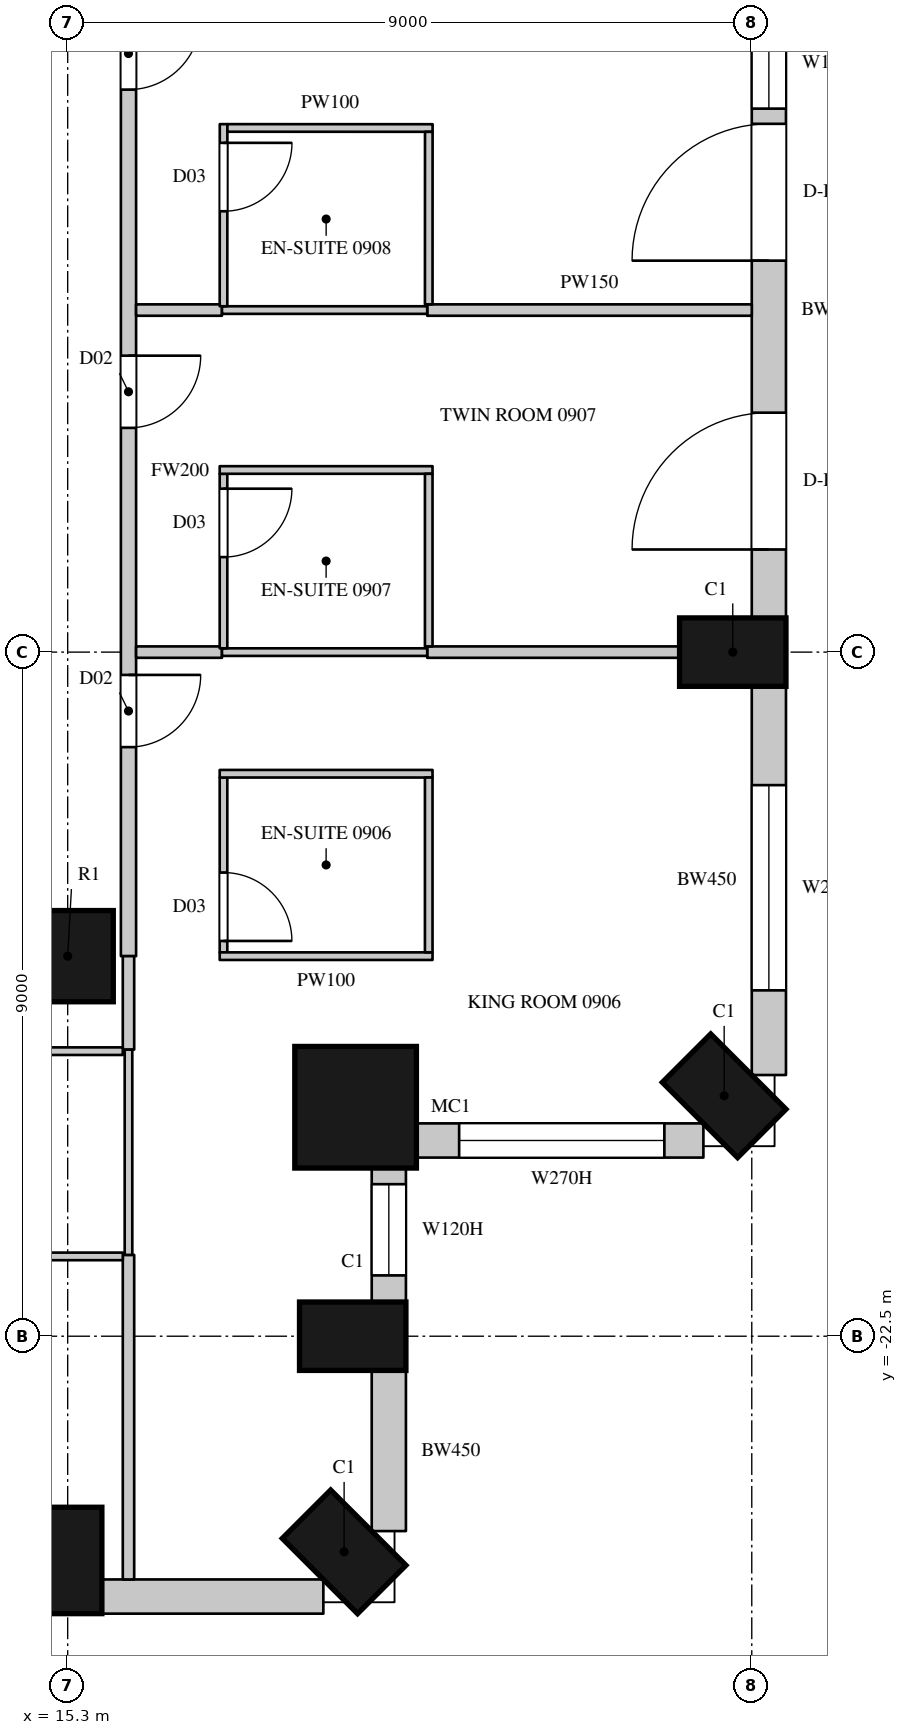
"""IFC4 building model, lengths in metres.
Left out: names, types, materials, properties, quantities, classifications, styles, units other than length and angle.
Written with IfcOpenShell. Run it as: python <this file> out.ifc"""

import sys

from ifc_helpers import new_model, si_unit, direction, frame, frame_2d, origin, origin_2d, place, context, subcontext, project, spatial, rectangle, circle, extrude, element, fill, save


model = new_model("IFC4")
c1 = context("Model", 3, precision=1e-05, world=origin(), true_north=direction((0.0, 1.0)))
c2 = subcontext(c1, "Body", "Model", "MODEL_VIEW")
j1 = project(units=[si_unit("LENGTHUNIT", "METRE"), si_unit("PLANEANGLEUNIT", "RADIAN")], contexts=[c1])
p1 = place(None, origin())
s1 = spatial("IfcSite", under=j1, at=p1, CompositionType="ELEMENT")
p2 = place(p1, origin())
s2 = spatial("IfcBuilding", under=s1, at=p2, CompositionType="ELEMENT")
p3 = place(p2, frame((0.0, 0.0, 62.7)))
s3 = spatial("IfcBuildingStorey", under=s2, at=p3, CompositionType="ELEMENT", Elevation=62.7)
for number, where, z_axis, x_axis in (
    (1, (15.3, -25.45, 0.0), (0.0, 0.0, 1.0), (1.0, 0.0, 0.0)),
    (2, (18.937, -25.337, 0.0), (0.0, 0.0, 1.0), (0.707, 0.707, 0.0)),
    (3, (19.05, -22.5, 0.0), (0.0, 0.0, 1.0), (0.0, 1.0, 0.0)),
):
    element("IfcColumn", number, at=place(p3, frame(where, z_axis=z_axis, x_axis=x_axis)), inside=s3, PredefinedType="COLUMN", context=c2, shape_type="SweptSolid", body=[
        extrude(rectangle(XDim=0.9, YDim=1.4, at=origin_2d()), origin(), (0.0, 0.0, 1.0), 3.6),
    ])
p4 = place(p3, frame((19.088, -19.488, 0.0), z_axis=(0.0, 0.0, 1.0), x_axis=(1.0, 0.0, 0.0)))
e4 = element("IfcColumn", 4, at=p4, inside=s3, PredefinedType="COLUMN", context=c2, shape_type="SweptSolid", body=[
    extrude(circle(Radius=0.8, at=origin_2d()), origin(), (0.0, 0.0, 1.0), 3.6),
])
for number, where, z_axis, x_axis in (
    (5, (23.937, -19.337, 0.0), (0.0, 0.0, 1.0), (0.707, 0.707, 0.0)),
    (6, (24.05, -13.5, 0.0), (0.0, 0.0, 1.0), (0.0, 1.0, 0.0)),
):
    element("IfcColumn", number, at=place(p3, frame(where, z_axis=z_axis, x_axis=x_axis)), inside=s3, PredefinedType="COLUMN", context=c2, shape_type="SweptSolid", body=[
        extrude(rectangle(XDim=0.9, YDim=1.4, at=origin_2d()), origin(), (0.0, 0.0, 1.0), 3.6),
    ])
p5 = place(p3, frame((15.3, -17.5, 0.0), z_axis=(0.0, 0.0, 1.0), x_axis=(1.0, 0.0, 0.0)))
e7 = element("IfcColumn", 7, at=p5, inside=s3, PredefinedType="COLUMN", context=c2, shape_type="SweptSolid", body=[
    extrude(circle(Radius=0.6, at=origin_2d()), origin(), (0.0, 0.0, 1.0), 3.6),
])
p6 = place(p3, frame((15.75, -25.925, 0.0), z_axis=(0.0, 0.0, 1.0), x_axis=(1.0, 0.0, 0.0)))
e8 = element("IfcWall", 8, at=p6, inside=s3, PredefinedType="SOLIDWALL", context=c2, shape_type="SweptSolid", body=[
    extrude(rectangle(XDim=2.914, YDim=0.45, at=frame_2d((1.457, 0.0))), origin(), (0.0, 0.0, 1.0), 3.3),
])
p7 = place(p3, frame((19.525, -25.064, 0.0), z_axis=(0.0, 0.0, 1.0), x_axis=(0.0, 1.0, 0.0)))
e9 = element("IfcWall", 9, at=p7, inside=s3, PredefinedType="SOLIDWALL", context=c2, shape_type="SweptSolid", body=[
    extrude(rectangle(XDim=2.114, YDim=0.45, at=frame_2d((1.057, 0.0))), origin(), (0.0, 0.0, 1.0), 3.3),
])
p8 = place(p3, frame((19.525, -22.05, 0.0), z_axis=(0.0, 0.0, 1.0), x_axis=(0.0, 1.0, 0.0)))
e10 = element("IfcWall", 10, at=p8, inside=s3, PredefinedType="SOLIDWALL", context=c2, shape_type="SweptSolid", body=[
    extrude(rectangle(XDim=1.792, YDim=0.45, at=frame_2d((0.896, 0.0))), origin(), (0.0, 0.0, 1.0), 3.3),
])
p9 = place(p8, frame((0.35, 0.0, 1.05)))
e11 = element("IfcOpeningElement", 11, at=p9, cuts=e10, PredefinedType="OPENING", context=c2, shape_type="SweptSolid", body=[
    extrude(rectangle(XDim=1.2, YDim=2.0, at=frame_2d((0.6, 1.0))), frame((0.0, 0.235, 0.0), z_axis=(0.0, -1.0, 0.0), x_axis=(1.0, 0.0, 0.0)), (0.0, 0.0, 1.0), 0.47),
])
p10 = place(p3, frame((19.858, -19.925, 0.0), z_axis=(0.0, 0.0, 1.0), x_axis=(1.0, 0.0, 0.0)))
e12 = element("IfcWall", 12, at=p10, inside=s3, PredefinedType="SOLIDWALL", context=c2, shape_type="SweptSolid", body=[
    extrude(rectangle(XDim=3.805, YDim=0.45, at=frame_2d((1.903, 0.0))), origin(), (0.0, 0.0, 1.0), 3.3),
])
p11 = place(p10, frame((0.592, 0.0, 1.05)))
e13 = element("IfcOpeningElement", 13, at=p11, cuts=e12, PredefinedType="OPENING", context=c2, shape_type="SweptSolid", body=[
    extrude(rectangle(XDim=2.7, YDim=2.0, at=frame_2d((1.35, 1.0))), frame((0.0, 0.235, 0.0), z_axis=(0.0, -1.0, 0.0), x_axis=(1.0, 0.0, 0.0)), (0.0, 0.0, 1.0), 0.47),
])
p12 = place(p3, frame((24.525, -19.064, 0.0), z_axis=(0.0, 0.0, 1.0), x_axis=(0.0, 1.0, 0.0)))
e14 = element("IfcWall", 14, at=p12, inside=s3, PredefinedType="SOLIDWALL", context=c2, shape_type="SweptSolid", body=[
    extrude(rectangle(XDim=5.114, YDim=0.45, at=frame_2d((2.557, 0.0))), origin(), (0.0, 0.0, 1.0), 3.3),
])
p13 = place(p12, frame((1.114, 0.0, 1.05)))
e15 = element("IfcOpeningElement", 15, at=p13, cuts=e14, PredefinedType="OPENING", context=c2, shape_type="SweptSolid", body=[
    extrude(rectangle(XDim=2.7, YDim=2.0, at=frame_2d((1.35, 1.0))), frame((0.0, 0.235, 0.0), z_axis=(0.0, -1.0, 0.0), x_axis=(1.0, 0.0, 0.0)), (0.0, 0.0, 1.0), 0.47),
])
p14 = place(p3, frame((24.525, -13.05, 0.0), z_axis=(0.0, 0.0, 1.0), x_axis=(0.0, 1.0, 0.0)))
e16 = element("IfcWall", 16, at=p14, inside=s3, PredefinedType="SOLIDWALL", context=c2, shape_type="SweptSolid", body=[
    extrude(rectangle(XDim=8.1, YDim=0.45, at=frame_2d((4.05, 0.0))), origin(), (0.0, 0.0, 1.0), 3.3),
])
p15 = place(p14, frame((0.9, 0.0, 0.0)))
e17 = element("IfcOpeningElement", 17, at=p15, cuts=e16, PredefinedType="OPENING", context=c2, shape_type="SweptSolid", body=[
    extrude(rectangle(XDim=1.8, YDim=2.4, at=frame_2d((0.9, 1.2))), frame((0.0, 0.235, 0.0), z_axis=(0.0, -1.0, 0.0), x_axis=(1.0, 0.0, 0.0)), (0.0, 0.0, 1.0), 0.47),
])
p16 = place(p14, frame((4.7, 0.0, 0.0)))
e18 = element("IfcOpeningElement", 18, at=p16, cuts=e16, PredefinedType="OPENING", context=c2, shape_type="SweptSolid", body=[
    extrude(rectangle(XDim=1.8, YDim=2.4, at=frame_2d((0.9, 1.2))), frame((0.0, 0.235, 0.0), z_axis=(0.0, -1.0, 0.0), x_axis=(1.0, 0.0, 0.0)), (0.0, 0.0, 1.0), 0.47),
])
p17 = place(p14, frame((6.7, 0.0, 1.05)))
e19 = element("IfcOpeningElement", 19, at=p17, cuts=e16, PredefinedType="OPENING", context=c2, shape_type="SweptSolid", body=[
    extrude(rectangle(XDim=1.2, YDim=2.0, at=frame_2d((0.6, 1.0))), frame((0.0, 0.235, 0.0), z_axis=(0.0, -1.0, 0.0), x_axis=(1.0, 0.0, 0.0)), (0.0, 0.0, 1.0), 0.47),
])
p18 = place(p3, frame((16.1, -17.5, 0.0), z_axis=(0.0, 0.0, 1.0), x_axis=(0.0, 1.0, 0.0)))
e20 = element("IfcWall", 20, at=p18, inside=s3, PredefinedType="PARTITIONING", context=c2, shape_type="SweptSolid", body=[
    extrude(rectangle(XDim=12.75, YDim=0.2, at=frame_2d((6.375, 0.0))), origin(), (0.0, 0.0, 1.0), 3.3),
])
p19 = place(p18, frame((2.75, 0.0, 0.0)))
e21 = element("IfcOpeningElement", 21, at=p19, cuts=e20, PredefinedType="OPENING", context=c2, shape_type="SweptSolid", body=[
    extrude(rectangle(XDim=0.95, YDim=2.2, at=frame_2d((0.475, 1.1))), frame((0.0, 0.11, 0.0), z_axis=(0.0, -1.0, 0.0), x_axis=(1.0, 0.0, 0.0)), (0.0, 0.0, 1.0), 0.22),
])
p20 = place(p18, frame((6.95, 0.0, 0.0)))
e22 = element("IfcOpeningElement", 22, at=p20, cuts=e20, PredefinedType="OPENING", context=c2, shape_type="SweptSolid", body=[
    extrude(rectangle(XDim=0.95, YDim=2.2, at=frame_2d((0.475, 1.1))), frame((0.0, 0.11, 0.0), z_axis=(0.0, -1.0, 0.0), x_axis=(1.0, 0.0, 0.0)), (0.0, 0.0, 1.0), 0.22),
])
p21 = place(p18, frame((11.4, 0.0, 0.0)))
e23 = element("IfcOpeningElement", 23, at=p21, cuts=e20, PredefinedType="OPENING", context=c2, shape_type="SweptSolid", body=[
    extrude(rectangle(XDim=0.95, YDim=2.2, at=frame_2d((0.475, 1.1))), frame((0.0, 0.11, 0.0), z_axis=(0.0, -1.0, 0.0), x_axis=(1.0, 0.0, 0.0)), (0.0, 0.0, 1.0), 0.22),
])
p22 = place(p3, frame((16.1, -25.7, 0.0), z_axis=(0.0, 0.0, 1.0), x_axis=(0.0, 1.0, 0.0)))
e24 = element("IfcWall", 24, at=p22, inside=s3, PredefinedType="PARTITIONING", context=c2, shape_type="SweptSolid", body=[
    extrude(rectangle(XDim=4.27, YDim=0.15, at=frame_2d((2.135, 0.0))), origin(), (0.0, 0.0, 1.0), 3.3),
])
p23 = place(p3, frame((16.1, -18.73, 0.0), z_axis=(0.0, 0.0, 1.0), x_axis=(0.0, 1.0, 0.0)))
e25 = element("IfcWall", 25, at=p23, inside=s3, PredefinedType="PARTITIONING", context=c2, shape_type="SweptSolid", body=[
    extrude(rectangle(XDim=1.23, YDim=0.15, at=frame_2d((0.615, 0.0))), origin(), (0.0, 0.0, 1.0), 3.3),
])
p24 = place(p3, frame((16.2, -13.5, 0.0), z_axis=(0.0, 0.0, 1.0), x_axis=(1.0, 0.0, 0.0)))
e26 = element("IfcWall", 26, at=p24, inside=s3, PredefinedType="PARTITIONING", context=c2, shape_type="SweptSolid", body=[
    extrude(rectangle(XDim=1.13, YDim=0.15, at=frame_2d((0.565, 0.0))), origin(), (0.0, 0.0, 1.0), 3.3),
])
p25 = place(p3, frame((16.2, -9.0, 0.0), z_axis=(0.0, 0.0, 1.0), x_axis=(1.0, 0.0, 0.0)))
e27 = element("IfcWall", 27, at=p25, inside=s3, PredefinedType="PARTITIONING", context=c2, shape_type="SweptSolid", body=[
    extrude(rectangle(XDim=1.13, YDim=0.15, at=frame_2d((0.565, 0.0))), origin(), (0.0, 0.0, 1.0), 2.65),
])
p26 = place(p3, frame((20.03, -13.5, 0.0), z_axis=(0.0, 0.0, 1.0), x_axis=(1.0, 0.0, 0.0)))
e28 = element("IfcWall", 28, at=p26, inside=s3, PredefinedType="PARTITIONING", context=c2, shape_type="SweptSolid", body=[
    extrude(rectangle(XDim=3.32, YDim=0.15, at=frame_2d((1.66, 0.0))), origin(), (0.0, 0.0, 1.0), 3.3),
])
p27 = place(p3, frame((20.03, -9.0, 0.0), z_axis=(0.0, 0.0, 1.0), x_axis=(1.0, 0.0, 0.0)))
e29 = element("IfcWall", 29, at=p27, inside=s3, PredefinedType="PARTITIONING", context=c2, shape_type="SweptSolid", body=[
    extrude(rectangle(XDim=4.27, YDim=0.15, at=frame_2d((2.135, 0.0))), origin(), (0.0, 0.0, 1.0), 2.65),
])
for number, where, z_axis, x_axis in (
    (30, (13.65, -21.45, 0.0), (0.0, 0.0, 1.0), (1.0, 0.0, 0.0)),
    (31, (13.65, -18.75, 0.0), (0.0, 0.0, 1.0), (1.0, 0.0, 0.0)),
):
    element("IfcWall", number, at=place(p3, frame(where, z_axis=z_axis, x_axis=x_axis)), inside=s3, PredefinedType="PARTITIONING", context=c2, shape_type="SweptSolid", body=[
        extrude(rectangle(XDim=2.375, YDim=0.1, at=frame_2d((1.188, 0.0))), origin(), (0.0, 0.0, 1.0), 3.3),
    ])
for number, where, z_axis, x_axis in (
    (32, (16.1, -21.43, 0.0), (0.0, 0.0, 1.0), (0.0, 1.0, 0.0)),
    (33, (17.33, -13.5, 0.0), (0.0, 0.0, 1.0), (1.0, 0.0, 0.0)),
):
    element("IfcWall", number, at=place(p3, frame(where, z_axis=z_axis, x_axis=x_axis)), inside=s3, PredefinedType="PARTITIONING", context=c2, shape_type="SweptSolid", body=[
        extrude(rectangle(XDim=2.7, YDim=0.1, at=frame_2d((1.35, 0.0))), origin(), (0.0, 0.0, 1.0), 3.3),
    ])
p28 = place(p3, frame((17.33, -9.0, 0.0), z_axis=(0.0, 0.0, 1.0), x_axis=(1.0, 0.0, 0.0)))
e34 = element("IfcWall", 34, at=p28, inside=s3, PredefinedType="PARTITIONING", context=c2, shape_type="SweptSolid", body=[
    extrude(rectangle(XDim=2.7, YDim=0.1, at=frame_2d((1.35, 0.0))), origin(), (0.0, 0.0, 1.0), 2.65),
])
p29 = place(p3, frame((17.35, -17.45, 0.0), z_axis=(0.0, 0.0, 1.0), x_axis=(0.0, 1.0, 0.0)))
e35 = element("IfcWall", 35, at=p29, inside=s3, PredefinedType="PARTITIONING", context=c2, shape_type="SweptSolid", body=[
    extrude(rectangle(XDim=2.3, YDim=0.1, at=frame_2d((1.15, 0.0))), origin(), (0.0, 0.0, 1.0), 3.3),
])
p30 = place(p29, frame((0.15, 0.0, 0.0)))
e36 = element("IfcOpeningElement", 36, at=p30, cuts=e35, PredefinedType="OPENING", context=c2, shape_type="SweptSolid", body=[
    extrude(rectangle(XDim=0.9, YDim=2.2, at=frame_2d((0.45, 1.1))), frame((0.0, 0.06, 0.0), z_axis=(0.0, -1.0, 0.0), x_axis=(1.0, 0.0, 0.0)), (0.0, 0.0, 1.0), 0.12),
])
for number, where, z_axis, x_axis in (
    (37, (17.3, -17.5, 0.0), (0.0, 0.0, 1.0), (1.0, 0.0, 0.0)),
    (38, (17.3, -15.1, 0.0), (0.0, 0.0, 1.0), (1.0, 0.0, 0.0)),
):
    element("IfcWall", number, at=place(p3, frame(where, z_axis=z_axis, x_axis=x_axis)), inside=s3, PredefinedType="PARTITIONING", context=c2, shape_type="SweptSolid", body=[
        extrude(rectangle(XDim=2.8, YDim=0.1, at=frame_2d((1.4, 0.0))), origin(), (0.0, 0.0, 1.0), 3.3),
    ])
p31 = place(p3, frame((17.35, -13.45, 0.0), z_axis=(0.0, 0.0, 1.0), x_axis=(0.0, 1.0, 0.0)))
e39 = element("IfcWall", 39, at=p31, inside=s3, PredefinedType="PARTITIONING", context=c2, shape_type="SweptSolid", body=[
    extrude(rectangle(XDim=2.296, YDim=0.1, at=frame_2d((1.148, 0.0))), origin(), (0.0, 0.0, 1.0), 3.3),
])
p32 = place(p31, frame((1.2, 0.0, 0.0)))
e40 = element("IfcOpeningElement", 40, at=p32, cuts=e39, PredefinedType="OPENING", context=c2, shape_type="SweptSolid", body=[
    extrude(rectangle(XDim=0.9, YDim=2.2, at=frame_2d((0.45, 1.1))), frame((0.0, 0.06, 0.0), z_axis=(0.0, -1.0, 0.0), x_axis=(1.0, 0.0, 0.0)), (0.0, 0.0, 1.0), 0.12),
])
p33 = place(p3, frame((17.3, -11.104, 0.0), z_axis=(0.0, 0.0, 1.0), x_axis=(1.0, 0.0, 0.0)))
e41 = element("IfcWall", 41, at=p33, inside=s3, PredefinedType="PARTITIONING", context=c2, shape_type="SweptSolid", body=[
    extrude(rectangle(XDim=2.8, YDim=0.1, at=frame_2d((1.4, 0.0))), origin(), (0.0, 0.0, 1.0), 3.3),
])
p34 = place(p3, frame((17.35, -8.95, 0.0), z_axis=(0.0, 0.0, 1.0), x_axis=(0.000407580973, 0.999999916939, 0.0)))
e42 = element("IfcWall", 42, at=p34, inside=s3, PredefinedType="PARTITIONING", context=c2, shape_type="SweptSolid", body=[
    extrude(rectangle(XDim=2.396, YDim=0.1, at=frame_2d((1.198, 0.0))), origin(), (0.0, 0.0, 1.0), 3.3),
])
p35 = place(p34, frame((1.25, 0.0, 0.0)))
e43 = element("IfcOpeningElement", 43, at=p35, cuts=e42, PredefinedType="OPENING", context=c2, shape_type="SweptSolid", body=[
    extrude(rectangle(XDim=0.9, YDim=2.2, at=frame_2d((0.45, 1.1))), frame((0.0, 0.06, 0.0), z_axis=(0.0, -1.0, 0.0), x_axis=(1.0, 0.0, 0.0)), (0.0, 0.0, 1.0), 0.12),
])
p36 = place(p3, frame((17.401, -6.604, 0.0), z_axis=(0.0, 0.0, 1.0), x_axis=(0.9999999346, -0.000361663629, 0.0)))
e44 = element("IfcWall", 44, at=p36, inside=s3, PredefinedType="PARTITIONING", context=c2, shape_type="SweptSolid", body=[
    extrude(rectangle(XDim=2.7, YDim=0.1, at=frame_2d((1.35, 0.0))), origin(), (0.0, 0.0, 1.0), 3.3),
])
p37 = place(p3, frame((20.05, -17.45, 0.0), z_axis=(0.0, 0.0, 1.0), x_axis=(0.0, 1.0, 0.0)))
e45 = element("IfcWall", 45, at=p37, inside=s3, PredefinedType="PARTITIONING", context=c2, shape_type="SweptSolid", body=[
    extrude(rectangle(XDim=2.3, YDim=0.1, at=frame_2d((1.15, 0.0))), origin(), (0.0, 0.0, 1.0), 3.3),
])
p38 = place(p3, frame((20.05, -13.425, 0.0), z_axis=(0.0, 0.0, 1.0), x_axis=(0.0, 1.0, 0.0)))
e46 = element("IfcWall", 46, at=p38, inside=s3, PredefinedType="PARTITIONING", context=c2, shape_type="SweptSolid", body=[
    extrude(rectangle(XDim=2.271, YDim=0.1, at=frame_2d((1.135, 0.0))), origin(), (0.0, 0.0, 1.0), 3.3),
])
p39 = place(p3, frame((20.05, -8.925, 0.0), z_axis=(0.0, 0.0, 1.0), x_axis=(0.000430200003, 0.999999907464, 0.0)))
e47 = element("IfcWall", 47, at=p39, inside=s3, PredefinedType="PARTITIONING", context=c2, shape_type="SweptSolid", body=[
    extrude(rectangle(XDim=2.27, YDim=0.1, at=frame_2d((1.135, 0.0))), origin(), (0.0, 0.0, 1.0), 3.3),
])
p40 = place(p9, origin())
e48 = element("IfcWindow", 48, at=p40, inside=s3, PartitioningType="SINGLE_PANEL", PredefinedType="WINDOW", context=c2, shape_type="SweptSolid", body=[
    extrude(rectangle(XDim=1.2, YDim=2.0, at=frame_2d((0.6, 1.0))), frame((0.0, 0.135, 0.0), z_axis=(0.0, -1.0, 0.0), x_axis=(1.0, 0.0, 0.0)), (0.0, 0.0, 1.0), 0.06),
])
fill(e11, e48)
p41 = place(p11, origin())
e49 = element("IfcWindow", 49, at=p41, inside=s3, PartitioningType="SINGLE_PANEL", PredefinedType="WINDOW", context=c2, shape_type="SweptSolid", body=[
    extrude(rectangle(XDim=2.7, YDim=2.0, at=frame_2d((1.35, 1.0))), frame((0.0, 0.135, 0.0), z_axis=(0.0, -1.0, 0.0), x_axis=(1.0, 0.0, 0.0)), (0.0, 0.0, 1.0), 0.06),
])
fill(e13, e49)
p42 = place(p13, origin())
e50 = element("IfcWindow", 50, at=p42, inside=s3, PartitioningType="SINGLE_PANEL", PredefinedType="WINDOW", context=c2, shape_type="SweptSolid", body=[
    extrude(rectangle(XDim=2.7, YDim=2.0, at=frame_2d((1.35, 1.0))), frame((0.0, 0.135, 0.0), z_axis=(0.0, -1.0, 0.0), x_axis=(1.0, 0.0, 0.0)), (0.0, 0.0, 1.0), 0.06),
])
fill(e15, e50)
p43 = place(p15, origin())
e51 = element("IfcDoor", 51, at=p43, inside=s3, OperationType="SLIDING_TO_LEFT", PredefinedType="DOOR", context=c2, shape_type="SweptSolid", body=[
    extrude(rectangle(XDim=1.8, YDim=2.4, at=frame_2d((0.9, 1.2))), frame((0.0, 0.13, 0.0), z_axis=(0.0, -1.0, 0.0), x_axis=(1.0, 0.0, 0.0)), (0.0, 0.0, 1.0), 0.05),
])
fill(e17, e51)
p44 = place(p16, origin())
e52 = element("IfcDoor", 52, at=p44, inside=s3, OperationType="SLIDING_TO_LEFT", PredefinedType="DOOR", context=c2, shape_type="SweptSolid", body=[
    extrude(rectangle(XDim=1.8, YDim=2.4, at=frame_2d((0.9, 1.2))), frame((0.0, 0.13, 0.0), z_axis=(0.0, -1.0, 0.0), x_axis=(1.0, 0.0, 0.0)), (0.0, 0.0, 1.0), 0.05),
])
fill(e18, e52)
p45 = place(p17, origin())
e53 = element("IfcWindow", 53, at=p45, inside=s3, PartitioningType="SINGLE_PANEL", PredefinedType="WINDOW", context=c2, shape_type="SweptSolid", body=[
    extrude(rectangle(XDim=1.2, YDim=2.0, at=frame_2d((0.6, 1.0))), frame((0.0, 0.135, 0.0), z_axis=(0.0, -1.0, 0.0), x_axis=(1.0, 0.0, 0.0)), (0.0, 0.0, 1.0), 0.06),
])
fill(e19, e53)
p46 = place(p19, origin())
e54 = element("IfcDoor", 54, at=p46, inside=s3, OperationType="SINGLE_SWING_LEFT", PredefinedType="DOOR", context=c2, shape_type="SweptSolid", body=[
    extrude(rectangle(XDim=0.95, YDim=2.2, at=frame_2d((0.475, 1.1))), frame((0.0, 0.025, 0.0), z_axis=(0.0, -1.0, 0.0), x_axis=(1.0, 0.0, 0.0)), (0.0, 0.0, 1.0), 0.05),
])
fill(e21, e54)
p47 = place(p30, origin())
e55 = element("IfcDoor", 55, at=p47, inside=s3, OperationType="SINGLE_SWING_RIGHT", PredefinedType="DOOR", context=c2, shape_type="SweptSolid", body=[
    extrude(rectangle(XDim=0.9, YDim=2.2, at=frame_2d((0.45, 1.1))), frame((0.0, 0.025, 0.0), z_axis=(0.0, -1.0, 0.0), x_axis=(1.0, 0.0, 0.0)), (0.0, 0.0, 1.0), 0.05),
])
fill(e36, e55)
p48 = place(p20, origin())
e56 = element("IfcDoor", 56, at=p48, inside=s3, OperationType="SINGLE_SWING_LEFT", PredefinedType="DOOR", context=c2, shape_type="SweptSolid", body=[
    extrude(rectangle(XDim=0.95, YDim=2.2, at=frame_2d((0.475, 1.1))), frame((0.0, 0.025, 0.0), z_axis=(0.0, -1.0, 0.0), x_axis=(1.0, 0.0, 0.0)), (0.0, 0.0, 1.0), 0.05),
])
fill(e22, e56)
p49 = place(p32, origin())
e57 = element("IfcDoor", 57, at=p49, inside=s3, OperationType="SINGLE_SWING_LEFT", PredefinedType="DOOR", context=c2, shape_type="SweptSolid", body=[
    extrude(rectangle(XDim=0.9, YDim=2.2, at=frame_2d((0.45, 1.1))), frame((0.0, 0.025, 0.0), z_axis=(0.0, -1.0, 0.0), x_axis=(1.0, 0.0, 0.0)), (0.0, 0.0, 1.0), 0.05),
])
fill(e40, e57)
p50 = place(p21, origin())
e58 = element("IfcDoor", 58, at=p50, inside=s3, OperationType="SINGLE_SWING_LEFT", PredefinedType="DOOR", context=c2, shape_type="SweptSolid", body=[
    extrude(rectangle(XDim=0.95, YDim=2.2, at=frame_2d((0.475, 1.1))), frame((0.0, 0.025, 0.0), z_axis=(0.0, -1.0, 0.0), x_axis=(1.0, 0.0, 0.0)), (0.0, 0.0, 1.0), 0.05),
])
fill(e23, e58)
p51 = place(p35, origin())
e59 = element("IfcDoor", 59, at=p51, inside=s3, OperationType="SINGLE_SWING_LEFT", PredefinedType="DOOR", context=c2, shape_type="SweptSolid", body=[
    extrude(rectangle(XDim=0.9, YDim=2.2, at=frame_2d((0.45, 1.1))), frame((0.0, 0.025, 0.0), z_axis=(0.0, -1.0, 0.0), x_axis=(1.0, 0.0, 0.0)), (0.0, 0.0, 1.0), 0.05),
])
fill(e43, e59)
save(model, sys.argv[1])
